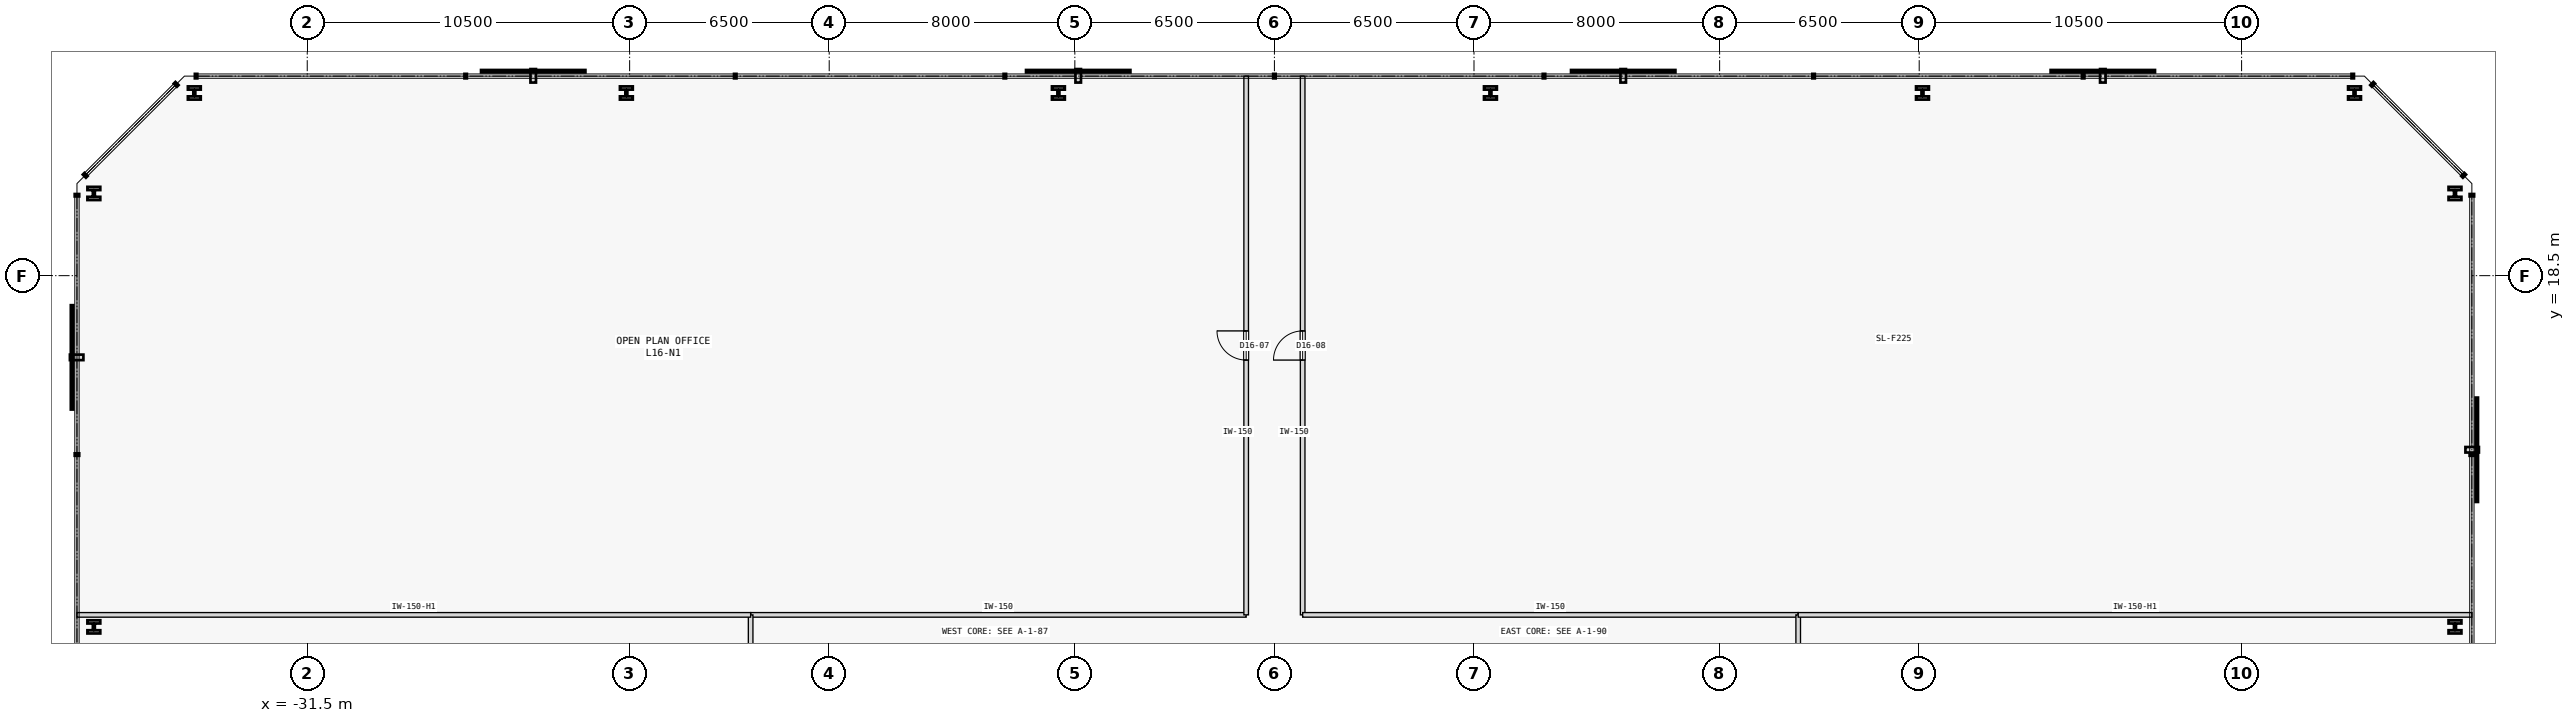
"""IFC4 building model, lengths in metres.
Left out: names, types, materials, properties, quantities, classifications, styles, units other than length and angle.
Written with IfcOpenShell. Run it as: python <this file> out.ifc"""

import sys

from ifc_helpers import new_model, si_unit, direction, frame, frame_2d, origin, origin_2d, place, context, subcontext, project, spatial, rectangle, i_section, extrude, element, fill, save


model = new_model("IFC4")
c1 = context("Model", 3, precision=1e-05, world=origin(), true_north=direction((0.0, 1.0)))
c2 = subcontext(c1, "Body", "Model", "MODEL_VIEW")
j1 = project(units=[si_unit("LENGTHUNIT", "METRE"), si_unit("PLANEANGLEUNIT", "RADIAN")], contexts=[c1])
p1 = place(None, origin())
s1 = spatial("IfcSite", under=j1, at=p1, CompositionType="ELEMENT")
p2 = place(p1, origin())
s2 = spatial("IfcBuilding", under=s1, at=p2, CompositionType="ELEMENT")
p3 = place(p2, frame((0.0, 0.0, 67.4)))
s3 = spatial("IfcBuildingStorey", under=s2, at=p3, CompositionType="ELEMENT", Elevation=67.4)
for number, where, z_axis, x_axis in (
    (1, (38.45, 7.059, 0.0), (0.0, 0.0, 1.0), (1.0, 0.0, 0.0)),
    (2, (38.45, 21.178, 0.0), (0.0, 0.0, 1.0), (1.0, 0.0, 0.0)),
    (3, (35.178, 24.45, 0.0), (0.0, 0.0, 1.0), (1.0, 0.0, 0.0)),
    (4, (21.107, 24.45, 0.0), (0.0, 0.0, 1.0), (1.0, 0.0, 0.0)),
    (5, (7.036, 24.45, 0.0), (0.0, 0.0, 1.0), (1.0, 0.0, 0.0)),
    (6, (-7.036, 24.45, 0.0), (0.0, 0.0, 1.0), (1.0, 0.0, 0.0)),
    (7, (-21.107, 24.45, 0.0), (0.0, 0.0, 1.0), (1.0, 0.0, 0.0)),
    (8, (-35.178, 24.45, 0.0), (0.0, 0.0, 1.0), (1.0, 0.0, 0.0)),
    (9, (-38.45, 21.178, 0.0), (0.0, 0.0, 1.0), (1.0, 0.0, 0.0)),
    (10, (-38.45, 7.059, 0.0), (0.0, 0.0, 1.0), (1.0, 0.0, 0.0)),
):
    element("IfcColumn", number, at=place(p3, frame(where, z_axis=z_axis, x_axis=x_axis)), inside=s3, PredefinedType="COLUMN", context=c2, shape_type="SweptSolid", body=[
        extrude(i_section(OverallWidth=0.42, OverallDepth=0.431, WebThickness=0.065, FlangeThickness=0.106, FilletRadius=0.015, at=origin_2d()), origin(), (0.0, 0.0, 1.0), 3.8),
    ])
p4 = place(p3, frame((-17.059, 7.45, 0.0), z_axis=(0.0, 0.0, 1.0), x_axis=(1.0, 0.0, 0.0)))
e11 = element("IfcWall", 11, at=p4, inside=s3, PredefinedType="PARTITIONING", context=c2, shape_type="SweptSolid", body=[
    extrude(rectangle(XDim=16.139, YDim=0.15, at=frame_2d((8.07, 0.0))), origin(), (0.0, 0.0, 1.0), 3.575),
])
p5 = place(p3, frame((-0.92, 7.45, 0.0), z_axis=(0.0, 0.0, 1.0), x_axis=(0.0, 1.0, 0.0)))
e12 = element("IfcWall", 12, at=p5, inside=s3, PredefinedType="PARTITIONING", context=c2, shape_type="SweptSolid", body=[
    extrude(rectangle(XDim=17.55, YDim=0.15, at=frame_2d((8.775, 0.0))), origin(), (0.0, 0.0, 1.0), 3.575),
])
p6 = place(p5, frame((8.3, 0.0, 0.0)))
e13 = element("IfcOpeningElement", 13, at=p6, cuts=e12, PredefinedType="OPENING", context=c2, shape_type="SweptSolid", body=[
    extrude(rectangle(XDim=0.95, YDim=2.15, at=frame_2d((0.475, 1.075))), frame((0.0, 0.085, 0.0), z_axis=(0.0, -1.0, 0.0), x_axis=(1.0, 0.0, 0.0)), (0.0, 0.0, 1.0), 0.17),
])
p7 = place(p3, frame((0.92, 7.45, 0.0), z_axis=(0.0, 0.0, 1.0), x_axis=(0.0, 1.0, 0.0)))
e14 = element("IfcWall", 14, at=p7, inside=s3, PredefinedType="PARTITIONING", context=c2, shape_type="SweptSolid", body=[
    extrude(rectangle(XDim=17.55, YDim=0.15, at=frame_2d((8.775, 0.0))), origin(), (0.0, 0.0, 1.0), 3.575),
])
p8 = place(p7, frame((8.3, 0.0, 0.0)))
e15 = element("IfcOpeningElement", 15, at=p8, cuts=e14, PredefinedType="OPENING", context=c2, shape_type="SweptSolid", body=[
    extrude(rectangle(XDim=0.95, YDim=2.15, at=frame_2d((0.475, 1.075))), frame((0.0, 0.085, 0.0), z_axis=(0.0, -1.0, 0.0), x_axis=(1.0, 0.0, 0.0)), (0.0, 0.0, 1.0), 0.17),
])
p9 = place(p3, frame((0.92, 7.45, 0.0), z_axis=(0.0, 0.0, 1.0), x_axis=(1.0, 0.0, 0.0)))
e16 = element("IfcWall", 16, at=p9, inside=s3, PredefinedType="PARTITIONING", context=c2, shape_type="SweptSolid", body=[
    extrude(rectangle(XDim=16.139, YDim=0.15, at=frame_2d((8.07, 0.0))), origin(), (0.0, 0.0, 1.0), 3.575),
])
for number, where, z_axis, x_axis in (
    (17, (-17.059, 0.92, 0.0), (0.0, 0.0, 1.0), (0.0, 1.0, 0.0)),
    (18, (17.059, 0.92, 0.0), (0.0, 0.0, 1.0), (0.0, 1.0, 0.0)),
):
    element("IfcWall", number, at=place(p3, frame(where, z_axis=z_axis, x_axis=x_axis)), inside=s3, PredefinedType="PARTITIONING", context=c2, shape_type="SweptSolid", body=[
        extrude(rectangle(XDim=6.53, YDim=0.15, at=frame_2d((3.265, 0.0))), origin(), (0.0, 0.0, 1.0), 3.575),
    ])
for number, where, z_axis, x_axis in (
    (19, (-39.0, 7.45, 0.0), (0.0, 0.0, 1.0), (1.0, 0.0, 0.0)),
    (20, (17.059, 7.45, 0.0), (0.0, 0.0, 1.0), (1.0, 0.0, 0.0)),
):
    element("IfcWall", number, at=place(p3, frame(where, z_axis=z_axis, x_axis=x_axis)), inside=s3, PredefinedType="PARTITIONING", context=c2, shape_type="SweptSolid", body=[
        extrude(rectangle(XDim=21.941, YDim=0.15, at=frame_2d((10.97, 0.0))), origin(), (0.0, 0.0, 1.0), 3.125),
    ])
p10 = place(p6, origin())
e21 = element("IfcDoor", 21, at=p10, inside=s3, OperationType="SINGLE_SWING_RIGHT", PredefinedType="DOOR", context=c2, shape_type="SweptSolid", body=[
    extrude(rectangle(XDim=0.95, YDim=2.15, at=frame_2d((0.475, 1.075))), frame((0.0, 0.025, 0.0), z_axis=(0.0, -1.0, 0.0), x_axis=(1.0, 0.0, 0.0)), (0.0, 0.0, 1.0), 0.05),
])
fill(e13, e21)
p11 = place(p8, origin())
e22 = element("IfcDoor", 22, at=p11, inside=s3, OperationType="SINGLE_SWING_LEFT", PredefinedType="DOOR", context=c2, shape_type="SweptSolid", body=[
    extrude(rectangle(XDim=0.95, YDim=2.15, at=frame_2d((0.475, 1.075))), frame((0.0, 0.025, 0.0), z_axis=(0.0, -1.0, 0.0), x_axis=(1.0, 0.0, 0.0)), (0.0, 0.0, 1.0), 0.05),
])
fill(e15, e22)
save(model, sys.argv[1])
